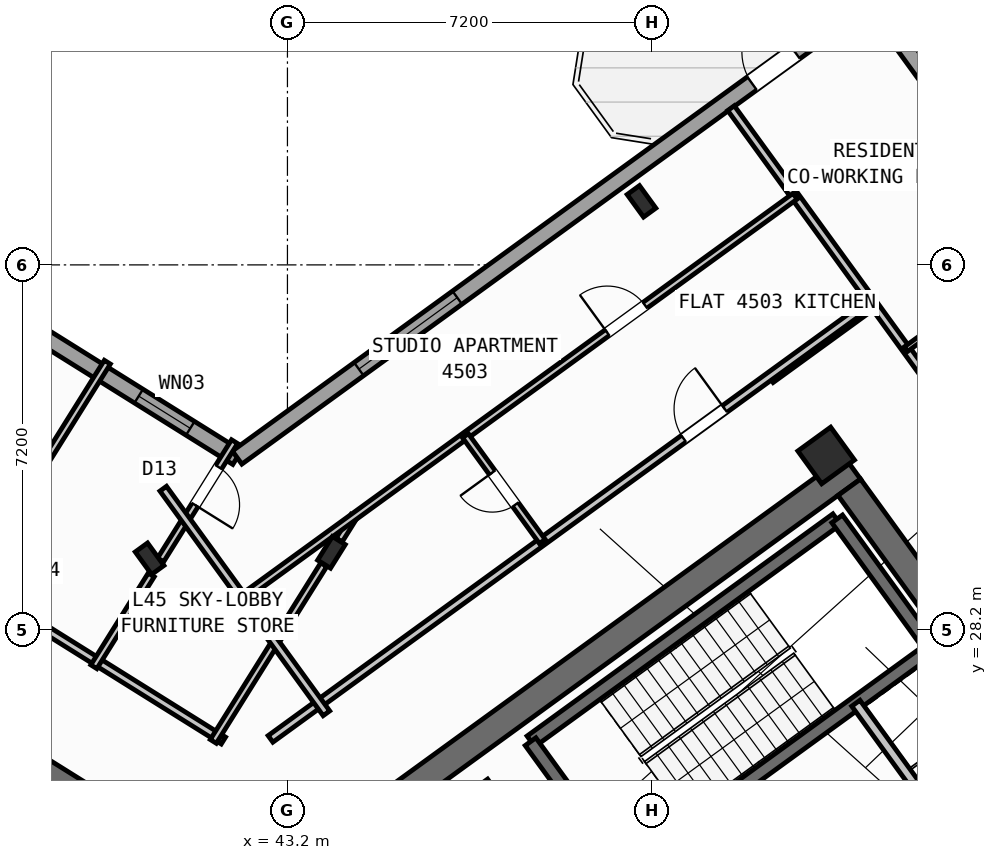
"""IFC4 building model, lengths in metres.
Left out: names, types, materials, properties, quantities, classifications, styles, units other than length and angle.
Written with IfcOpenShell. Run it as: python <this file> out.ifc"""

import sys

from ifc_helpers import new_model, si_unit, direction, frame, frame_2d, origin, origin_2d, place, context, subcontext, project, spatial, rectangle, hollow_rectangle, i_section, extrude, source, transform, mapped, element, fill, save


model = new_model("IFC4")
c1 = context("Model", 3, precision=1e-05, world=origin(), true_north=direction((0.0, 1.0)))
c2 = subcontext(c1, "Body", "Model", "MODEL_VIEW")
j1 = project(units=[si_unit("LENGTHUNIT", "METRE"), si_unit("PLANEANGLEUNIT", "RADIAN")], contexts=[c1])
p1 = place(None, origin())
s1 = spatial("IfcSite", under=j1, at=p1, CompositionType="ELEMENT")
p2 = place(p1, origin())
s2 = spatial("IfcBuilding", under=s1, at=p2, CompositionType="ELEMENT")
p3 = place(p2, frame((0.0, 0.0, 179.4)))
s3 = spatial("IfcBuildingStorey", under=s2, at=p3, CompositionType="ELEMENT", Elevation=179.4)
p4 = place(p3, frame((40.573, 24.01, 0.0), z_axis=(0.0, 0.0, 1.0), x_axis=(-0.848047359947, 0.529920442413, 0.0)))
e1 = element("IfcWall", 1, at=p4, inside=s3, PredefinedType="SHEAR", context=c2, shape_type="SweptSolid", body=[
    extrude(rectangle(XDim=13.14, YDim=0.55, at=frame_2d((6.57, 0.0))), origin(), (0.0, 0.0, 1.0), 4.55),
])
p5 = place(p3, frame((44.365, 24.142, 0.0), z_axis=(0.0, 0.0, 1.0), x_axis=(0.809024304885, 0.587775190107, 0.0)))
e2 = element("IfcWall", 2, at=p5, inside=s3, PredefinedType="SHEAR", context=c2, shape_type="SweptSolid", body=[
    extrude(rectangle(XDim=12.34, YDim=0.55, at=frame_2d((6.17, 0.0))), origin(), (0.0, 0.0, 1.0), 4.55),
])
p6 = place(p3, frame((58.064, 25.813, 0.0), z_axis=(0.0, 0.0, 1.0), x_axis=(-0.587764933797, 0.809031756236, 0.0)))
e3 = element("IfcWall", 3, at=p6, inside=s3, PredefinedType="SHEAR", context=c2, shape_type="SweptSolid", body=[
    extrude(rectangle(XDim=6.425, YDim=0.55, at=frame_2d((3.212, 0.0))), origin(), (0.0, 0.0, 1.0), 4.55),
])
m1 = source(origin(), c2, "Body", "SweptSolid", [
    extrude(i_section(OverallWidth=0.3, OverallDepth=0.55, WebThickness=0.015, FlangeThickness=0.029, at=origin_2d()), origin(), (0.0, 0.0, 1.0), 4.8),
])
for number, where, z_axis, x_axis in (
    (4, (44.068, 29.726, 0.0), (0.0, 0.0, 1.0), (-0.848, 0.53, 0.0)),
    (5, (40.479, 29.601, 0.0), (0.0, 0.0, 1.0), (0.809, 0.588, 0.0)),
):
    element("IfcColumn", number, at=place(p3, frame(where, z_axis=z_axis, x_axis=x_axis)), inside=s3, PredefinedType="COLUMN", context=c2, shape_type="MappedRepresentation", body=[
        mapped(m1, transform((0.0, 0.0, 0.0), scale=1.0)),
    ])
m2 = source(origin(), c2, "Body", "SweptSolid", [
    extrude(hollow_rectangle(XDim=0.8, YDim=0.8, WallThickness=0.032, at=origin_2d()), origin(), (0.0, 0.0, 1.0), 4.8),
])
p7 = place(p3, frame((53.832, 31.638, 0.0), z_axis=(0.0, 0.0, 1.0), x_axis=(0.809016994375, 0.587785252292, 0.0)))
e6 = element("IfcColumn", 6, at=p7, inside=s3, PredefinedType="COLUMN", context=c2, shape_type="MappedRepresentation", body=[
    mapped(m2, transform((0.0, 0.0, 0.0), scale=1.0)),
])
p8 = place(p3, frame((50.188, 36.654, 0.0), z_axis=(0.0, 0.0, 1.0), x_axis=(0.809016994375, 0.587785252292, 0.0)))
e7 = element("IfcColumn", 7, at=p8, inside=s3, PredefinedType="COLUMN", context=c2, shape_type="MappedRepresentation", body=[
    mapped(m1, transform((0.0, 0.0, 0.0), scale=1.0)),
])
p9 = place(p3, frame((17.424, 47.083, 0.0), z_axis=(0.0, 0.0, 1.0), x_axis=(0.848049927979, -0.529916332693, 0.0)))
e8 = element("IfcWall", 8, at=p9, inside=s3, PredefinedType="STANDARD", context=c2, shape_type="SweptSolid", body=[
    extrude(rectangle(XDim=29.223, YDim=0.32, at=frame_2d((14.612, 0.0))), origin(), (0.0, 0.0, 1.0), 4.55),
])
p10 = place(p9, frame((2.745, 0.0, 0.0)))
e9 = element("IfcOpeningElement", 9, at=p10, cuts=e8, PredefinedType="OPENING", context=c2, shape_type="SweptSolid", body=[
    extrude(rectangle(XDim=1.05, YDim=2.15, at=frame_2d((0.525, 1.075))), frame((0.0, 0.17, 0.0), z_axis=(0.0, -1.0, 0.0), x_axis=(1.0, 0.0, 0.0)), (0.0, 0.0, 1.0), 0.34),
])
p11 = place(p9, frame((21.926, 0.0, 0.75)))
e10 = element("IfcOpeningElement", 10, at=p11, cuts=e8, PredefinedType="OPENING", context=c2, shape_type="SweptSolid", body=[
    extrude(rectangle(XDim=2.4, YDim=1.6, at=frame_2d((1.2, 0.8))), frame((0.0, 0.17, 0.0), z_axis=(0.0, -1.0, 0.0), x_axis=(1.0, 0.0, 0.0)), (0.0, 0.0, 1.0), 0.34),
])
p12 = place(p9, frame((26.934, 0.0, 0.95)))
e11 = element("IfcOpeningElement", 11, at=p12, cuts=e8, PredefinedType="OPENING", context=c2, shape_type="SweptSolid", body=[
    extrude(rectangle(XDim=1.2, YDim=1.4, at=frame_2d((0.6, 0.7))), frame((0.0, 0.17, 0.0), z_axis=(0.0, -1.0, 0.0), x_axis=(1.0, 0.0, 0.0)), (0.0, 0.0, 1.0), 0.34),
])
p13 = place(p9, frame((10.057, 0.0, 1.0)))
e12 = element("IfcOpeningElement", 12, at=p13, cuts=e8, PredefinedType="OPENING", context=c2, shape_type="SweptSolid", body=[
    extrude(rectangle(XDim=0.65, YDim=1.15, at=frame_2d((0.325, 0.575))), frame((0.0, 0.17, 0.0), z_axis=(0.0, -1.0, 0.0), x_axis=(1.0, 0.0, 0.0)), (0.0, 0.0, 1.0), 0.34),
])
p14 = place(p9, frame((14.636, 0.0, 1.0)))
e13 = element("IfcOpeningElement", 13, at=p14, cuts=e8, PredefinedType="OPENING", context=c2, shape_type="SweptSolid", body=[
    extrude(rectangle(XDim=0.9, YDim=1.25, at=frame_2d((0.45, 0.625))), frame((0.0, 0.17, 0.0), z_axis=(0.0, -1.0, 0.0), x_axis=(1.0, 0.0, 0.0)), (0.0, 0.0, 1.0), 0.34),
])
p15 = place(p9, frame((8.052, 0.0, 1.0)))
e14 = element("IfcOpeningElement", 14, at=p15, cuts=e8, PredefinedType="OPENING", context=c2, shape_type="SweptSolid", body=[
    extrude(rectangle(XDim=0.65, YDim=1.15, at=frame_2d((0.325, 0.575))), frame((0.0, 0.17, 0.0), z_axis=(0.0, -1.0, 0.0), x_axis=(1.0, 0.0, 0.0)), (0.0, 0.0, 1.0), 0.34),
])
p16 = place(p3, frame((42.207, 31.597, 0.0), z_axis=(0.0, 0.0, 1.0), x_axis=(0.809020333377, 0.587780656523, 0.0)))
e15 = element("IfcWall", 15, at=p16, inside=s3, PredefinedType="STANDARD", context=c2, shape_type="SweptSolid", body=[
    extrude(rectangle(XDim=15.223, YDim=0.32, at=frame_2d((7.611, 0.0))), origin(), (0.0, 0.0, 1.0), 4.55),
])
p17 = place(p16, frame((12.562, 0.0, 0.0)))
e16 = element("IfcOpeningElement", 16, at=p17, cuts=e15, PredefinedType="OPENING", context=c2, shape_type="SweptSolid", body=[
    extrude(rectangle(XDim=1.05, YDim=2.15, at=frame_2d((0.525, 1.075))), frame((0.0, 0.17, 0.0), z_axis=(0.0, -1.0, 0.0), x_axis=(1.0, 0.0, 0.0)), (0.0, 0.0, 1.0), 0.34),
])
p18 = place(p16, frame((2.97, 0.0, 0.75)))
e17 = element("IfcOpeningElement", 17, at=p18, cuts=e15, PredefinedType="OPENING", context=c2, shape_type="SweptSolid", body=[
    extrude(rectangle(XDim=2.4, YDim=1.6, at=frame_2d((1.2, 0.8))), frame((0.0, 0.17, 0.0), z_axis=(0.0, -1.0, 0.0), x_axis=(1.0, 0.0, 0.0)), (0.0, 0.0, 1.0), 0.34),
])
p19 = place(p3, frame((54.81, 40.5, 0.0), z_axis=(0.0, 0.0, 1.0), x_axis=(0.587783625747, -0.809018176127, 0.0)))
e18 = element("IfcWall", 18, at=p19, inside=s3, PredefinedType="STANDARD", context=c2, shape_type="SweptSolid", body=[
    extrude(rectangle(XDim=21.587, YDim=0.32, at=frame_2d((10.794, 0.0))), origin(), (0.0, 0.0, 1.0), 4.025),
])
p20 = place(p19, frame((9.061, 0.0, 0.75)))
e19 = element("IfcOpeningElement", 19, at=p20, cuts=e18, PredefinedType="OPENING", context=c2, shape_type="SweptSolid", body=[
    extrude(rectangle(XDim=2.4, YDim=1.6, at=frame_2d((1.2, 0.8))), frame((0.0, 0.17, 0.0), z_axis=(0.0, -1.0, 0.0), x_axis=(1.0, 0.0, 0.0)), (0.0, 0.0, 1.0), 0.34),
])
p21 = place(p19, frame((18.184, 0.0, 0.85)))
e20 = element("IfcOpeningElement", 20, at=p21, cuts=e18, PredefinedType="OPENING", context=c2, shape_type="SweptSolid", body=[
    extrude(rectangle(XDim=1.8, YDim=1.5, at=frame_2d((0.9, 0.75))), frame((0.0, 0.17, 0.0), z_axis=(0.0, -1.0, 0.0), x_axis=(1.0, 0.0, 0.0)), (0.0, 0.0, 1.0), 0.34),
])
p22 = place(p3, frame((39.721, 23.788, 0.0), z_axis=(0.0, 0.0, 1.0), x_axis=(-0.848054434086, 0.529909121291, 0.0)))
e21 = element("IfcWall", 21, at=p22, inside=s3, PredefinedType="SHEAR", context=c2, shape_type="SweptSolid", body=[
    extrude(rectangle(XDim=7.33, YDim=0.26, at=frame_2d((3.665, 0.0))), origin(), (0.0, 0.0, 1.0), 4.55),
])
p23 = place(p3, frame((48.006, 25.996, 0.0), z_axis=(0.0, 0.0, 1.0), x_axis=(0.80901903764, 0.587782439969, 0.0)))
e22 = element("IfcWall", 22, at=p23, inside=s3, PredefinedType="SHEAR", context=c2, shape_type="SweptSolid", body=[
    extrude(rectangle(XDim=7.46, YDim=0.26, at=frame_2d((3.73, 0.0))), origin(), (0.0, 0.0, 1.0), 4.55),
])
p24 = place(p3, frame((49.863, 23.44, 0.0), z_axis=(0.0, 0.0, 1.0), x_axis=(0.809003474932, 0.587803859759, 0.0)))
e23 = element("IfcWall", 23, at=p24, inside=s3, PredefinedType="SHEAR", context=c2, shape_type="SweptSolid", body=[
    extrude(rectangle(XDim=7.46, YDim=0.26, at=frame_2d((3.73, 0.0))), origin(), (0.0, 0.0, 1.0), 4.55),
])
p25 = place(p24, frame((0.36, 0.0, 0.0)))
e24 = element("IfcOpeningElement", 24, at=p25, cuts=e23, PredefinedType="OPENING", context=c2, shape_type="SweptSolid", body=[
    extrude(rectangle(XDim=0.86, YDim=2.05, at=frame_2d((0.43, 1.025))), frame((0.0, 0.14, 0.0), z_axis=(0.0, -1.0, 0.0), x_axis=(1.0, 0.0, 0.0)), (0.0, 0.0, 1.0), 0.28),
])
p26 = place(p3, frame((49.855, 23.434, 0.0), z_axis=(0.0, 0.0, 1.0), x_axis=(-0.58776738483, 0.809029975545, 0.0)))
e25 = element("IfcWall", 25, at=p26, inside=s3, PredefinedType="SHEAR", context=c2, shape_type="SweptSolid", body=[
    extrude(rectangle(XDim=3.16, YDim=0.26, at=frame_2d((1.58, 0.0))), origin(), (0.0, 0.0, 1.0), 4.55),
])
p27 = place(p3, frame((55.906, 27.831, 0.0), z_axis=(0.0, 0.0, 1.0), x_axis=(-0.587804123638, 0.809003283204, 0.0)))
e26 = element("IfcWall", 26, at=p27, inside=s3, PredefinedType="SHEAR", context=c2, shape_type="SweptSolid", body=[
    extrude(rectangle(XDim=3.16, YDim=0.26, at=frame_2d((1.58, 0.0))), origin(), (0.0, 0.0, 1.0), 4.55),
])
p28 = place(p3, frame((48.786, 22.83, 0.0), z_axis=(0.0, 0.0, 1.0), x_axis=(-0.587783856777, 0.809018008275, 0.0)))
e27 = element("IfcWall", 27, at=p28, inside=s3, PredefinedType="STANDARD", context=c2, shape_type="SweptSolid", body=[
    extrude(rectangle(XDim=2.92, YDim=0.2, at=frame_2d((1.46, 0.0))), origin(), (0.0, 0.0, 1.0), 4.54),
])
p29 = place(p3, frame((56.111, 24.419, 0.0), z_axis=(0.0, 0.0, 1.0), x_axis=(-0.58777848983, 0.809021907548, 0.0)))
e28 = element("IfcWall", 28, at=p29, inside=s3, PredefinedType="STANDARD", context=c2, shape_type="SweptSolid", body=[
    extrude(rectangle(XDim=2.88, YDim=0.2, at=frame_2d((1.44, 0.0))), origin(), (0.0, 0.0, 1.0), 4.54),
])
p30 = place(p3, frame((53.425, 22.468, 0.0), z_axis=(0.0, 0.0, 1.0), x_axis=(0.809024377198, 0.587775090574, 0.0)))
e29 = element("IfcWall", 29, at=p30, inside=s3, PredefinedType="STANDARD", context=c2, shape_type="SweptSolid", body=[
    extrude(rectangle(XDim=5.418, YDim=0.2, at=frame_2d((2.709, 0.0))), origin(), (0.0, 0.0, 1.0), 4.54),
])
p31 = place(p30, frame((4.28, 0.0, 0.0)))
e30 = element("IfcOpeningElement", 30, at=p31, cuts=e29, PredefinedType="OPENING", context=c2, shape_type="SweptSolid", body=[
    extrude(rectangle(XDim=0.86, YDim=2.05, at=frame_2d((0.43, 1.025))), frame((0.0, 0.11, 0.0), z_axis=(0.0, -1.0, 0.0), x_axis=(1.0, 0.0, 0.0)), (0.0, 0.0, 1.0), 0.22),
])
p32 = place(p30, frame((1.45, 0.0, 0.0)))
e31 = element("IfcOpeningElement", 31, at=p32, cuts=e29, PredefinedType="OPENING", context=c2, shape_type="SweptSolid", body=[
    extrude(rectangle(XDim=0.86, YDim=2.05, at=frame_2d((0.43, 1.025))), frame((0.0, 0.11, 0.0), z_axis=(0.0, -1.0, 0.0), x_axis=(1.0, 0.0, 0.0)), (0.0, 0.0, 1.0), 0.22),
])
p33 = place(p3, frame((41.936, 26.012, 0.0), z_axis=(0.0, 0.0, 1.0), x_axis=(-0.848051154596, 0.529914369676, 0.0)))
e32 = element("IfcWall", 32, at=p33, inside=s3, PredefinedType="PARTITIONING", context=c2, shape_type="SweptSolid", body=[
    extrude(rectangle(XDim=15.57, YDim=0.16, at=frame_2d((7.785, 0.0))), origin(), (0.0, 0.0, 1.0), 4.54),
])
p34 = place(p33, frame((4.1, 0.0, 0.0)))
e33 = element("IfcOpeningElement", 33, at=p34, cuts=e32, PredefinedType="OPENING", context=c2, shape_type="SweptSolid", body=[
    extrude(rectangle(XDim=0.96, YDim=2.08, at=frame_2d((0.48, 1.04))), frame((0.0, 0.09, 0.0), z_axis=(0.0, -1.0, 0.0), x_axis=(1.0, 0.0, 0.0)), (0.0, 0.0, 1.0), 0.18),
])
p35 = place(p33, frame((8.2, 0.0, 0.0)))
e34 = element("IfcOpeningElement", 34, at=p35, cuts=e32, PredefinedType="OPENING", context=c2, shape_type="SweptSolid", body=[
    extrude(rectangle(XDim=1.7, YDim=2.2, at=frame_2d((0.85, 1.1))), frame((0.0, 0.09, 0.0), z_axis=(0.0, -1.0, 0.0), x_axis=(1.0, 0.0, 0.0)), (0.0, 0.0, 1.0), 0.18),
])
p36 = place(p3, frame((42.156, 31.912, 0.0), z_axis=(0.0, 0.0, 1.0), x_axis=(-0.529943141103, -0.848033175765, 0.0)))
e35 = element("IfcWall", 35, at=p36, inside=s3, PredefinedType="PLUMBINGWALL", context=c2, shape_type="SweptSolid", body=[
    extrude(rectangle(XDim=2.753, YDim=0.14, at=frame_2d((1.376, 0.0))), origin(), (0.0, 0.0, 1.0), 4.135),
])
p37 = place(p36, frame((0.593, 0.0, 0.0)))
e36 = element("IfcOpeningElement", 36, at=p37, cuts=e35, PredefinedType="OPENING", context=c2, shape_type="SweptSolid", body=[
    extrude(rectangle(XDim=0.88, YDim=2.08, at=frame_2d((0.44, 1.04))), frame((0.0, 0.08, 0.0), z_axis=(0.0, -1.0, 0.0), x_axis=(1.0, 0.0, 0.0)), (0.0, 0.0, 1.0), 0.16),
])
p38 = place(p3, frame((40.512, 29.281, 0.0), z_axis=(0.0, 0.0, 1.0), x_axis=(-0.529947607416, -0.848030384712, 0.0)))
e37 = element("IfcWall", 37, at=p38, inside=s3, PredefinedType="PLUMBINGWALL", context=c2, shape_type="SweptSolid", body=[
    extrude(rectangle(XDim=2.138, YDim=0.14, at=frame_2d((1.069, 0.0))), origin(), (0.0, 0.0, 1.0), 4.54),
])
p39 = place(p3, frame((44.514, 30.439, 0.0), z_axis=(0.0, 0.0, 1.0), x_axis=(-0.530117963224, -0.847923902875, 0.0)))
e38 = element("IfcWall", 38, at=p39, inside=s3, PredefinedType="PLUMBINGWALL", context=c2, shape_type="SweptSolid", body=[
    extrude(rectangle(XDim=0.553, YDim=0.14, at=frame_2d((0.277, 0.0))), origin(), (0.0, 0.0, 1.0), 4.54),
])
p40 = place(p3, frame((43.916, 29.483, 0.0), z_axis=(0.0, 0.0, 1.0), x_axis=(-0.529897559092, -0.848061658648, 0.0)))
e39 = element("IfcWall", 39, at=p40, inside=s3, PredefinedType="PLUMBINGWALL", context=c2, shape_type="SweptSolid", body=[
    extrude(rectangle(XDim=4.113, YDim=0.14, at=frame_2d((2.057, 0.0))), origin(), (0.0, 0.0, 1.0), 4.025),
])
p41 = place(p3, frame((39.646, 33.48, 0.0), z_axis=(0.0, 0.0, 1.0), x_axis=(-0.529923555071, -0.848045414928, 0.0)))
e40 = element("IfcWall", 40, at=p41, inside=s3, PredefinedType="PLUMBINGWALL", context=c2, shape_type="SweptSolid", body=[
    extrude(rectangle(XDim=5.24, YDim=0.14, at=frame_2d((2.62, 0.0))), origin(), (0.0, 0.0, 1.0), 4.54),
])
p42 = place(p3, frame((52.739, 33.143, 0.0), z_axis=(0.0, 0.0, 1.0), x_axis=(0.809000999347, 0.58780726693, 0.0)))
e41 = element("IfcWall", 41, at=p42, inside=s3, PredefinedType="PARTITIONING", context=c2, shape_type="SweptSolid", body=[
    extrude(rectangle(XDim=2.51, YDim=0.16, at=frame_2d((1.255, 0.0))), origin(), (0.0, 0.0, 1.0), 4.54),
])
p43 = place(p3, frame((60.829, 26.278, 0.0), z_axis=(0.0, 0.0, 1.0), x_axis=(-0.587777474174, 0.809022645451, 0.0)))
e42 = element("IfcWall", 42, at=p43, inside=s3, PredefinedType="PARTITIONING", context=c2, shape_type="SweptSolid", body=[
    extrude(rectangle(XDim=15.1, YDim=0.16, at=frame_2d((7.55, 0.0))), origin(), (0.0, 0.0, 1.0), 4.54),
])
p44 = place(p3, frame((55.409, 33.738, 0.0), z_axis=(0.0, 0.0, 1.0), x_axis=(0.809005039917, 0.58780170584, 0.0)))
e43 = element("IfcWall", 43, at=p44, inside=s3, PredefinedType="PARTITIONING", context=c2, shape_type="SweptSolid", body=[
    extrude(rectangle(XDim=3.61, YDim=0.11, at=frame_2d((1.805, 0.0))), origin(), (0.0, 0.0, 1.0), 4.54),
])
p45 = place(p44, frame((1.345, 0.0, 0.0)))
e44 = element("IfcOpeningElement", 44, at=p45, cuts=e43, PredefinedType="OPENING", context=c2, shape_type="SweptSolid", body=[
    extrude(rectangle(XDim=0.92, YDim=2.08, at=frame_2d((0.46, 1.04))), frame((0.0, 0.065, 0.0), z_axis=(0.0, -1.0, 0.0), x_axis=(1.0, 0.0, 0.0)), (0.0, 0.0, 1.0), 0.13),
])
p46 = place(p3, frame((42.866, 26.044, 0.0), z_axis=(0.0, 0.0, 1.0), x_axis=(0.809020254154, 0.587780765566, 0.0)))
e45 = element("IfcWall", 45, at=p46, inside=s3, PredefinedType="PARTITIONING", context=c2, shape_type="SweptSolid", body=[
    extrude(rectangle(XDim=14.67, YDim=0.16, at=frame_2d((7.335, 0.0))), origin(), (0.0, 0.0, 1.0), 4.54),
])
p47 = place(p46, frame((10.08, 0.0, 0.0)))
e46 = element("IfcOpeningElement", 46, at=p47, cuts=e45, PredefinedType="OPENING", context=c2, shape_type="SweptSolid", body=[
    extrude(rectangle(XDim=1.0, YDim=2.1, at=frame_2d((0.5, 1.05))), frame((0.0, 0.09, 0.0), z_axis=(0.0, -1.0, 0.0), x_axis=(1.0, 0.0, 0.0)), (0.0, 0.0, 1.0), 0.18),
])
p48 = place(p3, frame((43.969, 26.55, 0.0), z_axis=(0.0, 0.0, 1.0), x_axis=(-0.587776919386, 0.80902304852, 0.0)))
e47 = element("IfcWall", 47, at=p48, inside=s3, PredefinedType="PARTITIONING", context=c2, shape_type="SweptSolid", body=[
    extrude(rectangle(XDim=5.48, YDim=0.16, at=frame_2d((2.74, 0.0))), origin(), (0.0, 0.0, 1.0), 4.54),
])
p49 = place(p3, frame((42.377, 28.878, 0.0), z_axis=(0.0, 0.0, 1.0), x_axis=(0.809020411523, 0.587780548963, 0.0)))
e48 = element("IfcWall", 48, at=p49, inside=s3, PredefinedType="PLUMBINGWALL", context=c2, shape_type="SweptSolid", body=[
    extrude(rectangle(XDim=13.4, YDim=0.14, at=frame_2d((6.7, 0.0))), origin(), (0.0, 0.0, 1.0), 4.54),
])
p50 = place(p49, frame((8.82, 0.0, 0.0)))
e49 = element("IfcOpeningElement", 49, at=p50, cuts=e48, PredefinedType="OPENING", context=c2, shape_type="SweptSolid", body=[
    extrude(rectangle(XDim=0.92, YDim=2.08, at=frame_2d((0.46, 1.04))), frame((0.0, 0.08, 0.0), z_axis=(0.0, -1.0, 0.0), x_axis=(1.0, 0.0, 0.0)), (0.0, 0.0, 1.0), 0.16),
])
p51 = place(p3, frame((48.229, 29.941, 0.0), z_axis=(0.0, 0.0, 1.0), x_axis=(-0.587772116736, 0.809026537752, 0.0)))
e50 = element("IfcWall", 50, at=p51, inside=s3, PredefinedType="PLUMBINGWALL", context=c2, shape_type="SweptSolid", body=[
    extrude(rectangle(XDim=2.58, YDim=0.14, at=frame_2d((1.29, 0.0))), origin(), (0.0, 0.0, 1.0), 4.54),
])
p52 = place(p51, frame((0.9, 0.0, 0.0)))
e51 = element("IfcOpeningElement", 51, at=p52, cuts=e50, PredefinedType="OPENING", context=c2, shape_type="SweptSolid", body=[
    extrude(rectangle(XDim=0.78, YDim=2.05, at=frame_2d((0.39, 1.025))), frame((0.0, 0.08, 0.0), z_axis=(0.0, -1.0, 0.0), x_axis=(1.0, 0.0, 0.0)), (0.0, 0.0, 1.0), 0.16),
])
m3 = source(origin(), c2, "Body", "SweptSolid", [
    extrude(rectangle(XDim=1.05, YDim=2.15, at=frame_2d((0.525, 1.075))), frame((0.0, 0.025, 0.0), z_axis=(0.0, -1.0, 0.0), x_axis=(1.0, 0.0, 0.0)), (0.0, 0.0, 1.0), 0.05),
])
p53 = place(p17, origin())
e52 = element("IfcDoor", 52, at=p53, inside=s3, OperationType="SINGLE_SWING_RIGHT", PredefinedType="DOOR", context=c2, shape_type="MappedRepresentation", body=[
    mapped(m3, transform((0.0, 0.0, 0.0), scale=1.0)),
])
fill(e16, e52)
m4 = source(origin(), c2, "Body", "SweptSolid", [
    extrude(rectangle(XDim=1.2, YDim=1.4, at=frame_2d((0.6, 0.7))), frame((0.0, 0.03, 0.0), z_axis=(0.0, -1.0, 0.0), x_axis=(1.0, 0.0, 0.0)), (0.0, 0.0, 1.0), 0.06),
])
p54 = place(p12, origin())
e53 = element("IfcWindow", 53, at=p54, inside=s3, PartitioningType="SINGLE_PANEL", PredefinedType="WINDOW", context=c2, shape_type="MappedRepresentation", body=[
    mapped(m4, transform((0.0, 0.0, 0.0), scale=1.0)),
])
fill(e11, e53)
m5 = source(origin(), c2, "Body", "SweptSolid", [
    extrude(rectangle(XDim=2.4, YDim=1.6, at=frame_2d((1.2, 0.8))), frame((0.0, 0.03, 0.0), z_axis=(0.0, -1.0, 0.0), x_axis=(1.0, 0.0, 0.0)), (0.0, 0.0, 1.0), 0.06),
])
p55 = place(p18, origin())
e54 = element("IfcWindow", 54, at=p55, inside=s3, PartitioningType="SINGLE_PANEL", PredefinedType="WINDOW", context=c2, shape_type="MappedRepresentation", body=[
    mapped(m5, transform((0.0, 0.0, 0.0), scale=1.0)),
])
fill(e17, e54)
m6 = source(origin(), c2, "Body", "SweptSolid", [
    extrude(rectangle(XDim=0.88, YDim=2.08, at=frame_2d((0.44, 1.04))), frame((0.0, 0.025, 0.0), z_axis=(0.0, -1.0, 0.0), x_axis=(1.0, 0.0, 0.0)), (0.0, 0.0, 1.0), 0.05),
])
p56 = place(p37, origin())
e55 = element("IfcDoor", 55, at=p56, inside=s3, OperationType="SINGLE_SWING_RIGHT", PredefinedType="DOOR", context=c2, shape_type="MappedRepresentation", body=[
    mapped(m6, transform((0.0, 0.0, 0.0), scale=1.0)),
])
fill(e36, e55)
m7 = source(origin(), c2, "Body", "SweptSolid", [
    extrude(rectangle(XDim=1.0, YDim=2.1, at=frame_2d((0.5, 1.05))), frame((0.0, 0.025, 0.0), z_axis=(0.0, -1.0, 0.0), x_axis=(1.0, 0.0, 0.0)), (0.0, 0.0, 1.0), 0.05),
])
p57 = place(p47, origin())
e56 = element("IfcDoor", 56, at=p57, inside=s3, OperationType="SINGLE_SWING_RIGHT", PredefinedType="DOOR", context=c2, shape_type="MappedRepresentation", body=[
    mapped(m7, transform((0.0, 0.0, 0.0), scale=1.0)),
])
fill(e46, e56)
m8 = source(origin(), c2, "Body", "SweptSolid", [
    extrude(rectangle(XDim=0.92, YDim=2.08, at=frame_2d((0.46, 1.04))), frame((0.0, 0.025, 0.0), z_axis=(0.0, -1.0, 0.0), x_axis=(1.0, 0.0, 0.0)), (0.0, 0.0, 1.0), 0.05),
])
p58 = place(p50, origin())
e57 = element("IfcDoor", 57, at=p58, inside=s3, OperationType="SINGLE_SWING_LEFT", PredefinedType="DOOR", context=c2, shape_type="MappedRepresentation", body=[
    mapped(m8, transform((0.0, 0.0, 0.0), scale=1.0)),
])
fill(e49, e57)
m9 = source(origin(), c2, "Body", "SweptSolid", [
    extrude(rectangle(XDim=0.78, YDim=2.05, at=frame_2d((0.39, 1.025))), frame((0.0, 0.025, 0.0), z_axis=(0.0, -1.0, 0.0), x_axis=(1.0, 0.0, 0.0)), (0.0, 0.0, 1.0), 0.05),
])
p59 = place(p52, origin())
e58 = element("IfcDoor", 58, at=p59, inside=s3, OperationType="SINGLE_SWING_RIGHT", PredefinedType="DOOR", context=c2, shape_type="MappedRepresentation", body=[
    mapped(m9, transform((0.0, 0.0, 0.0), scale=1.0)),
])
fill(e51, e58)
save(model, sys.argv[1])
